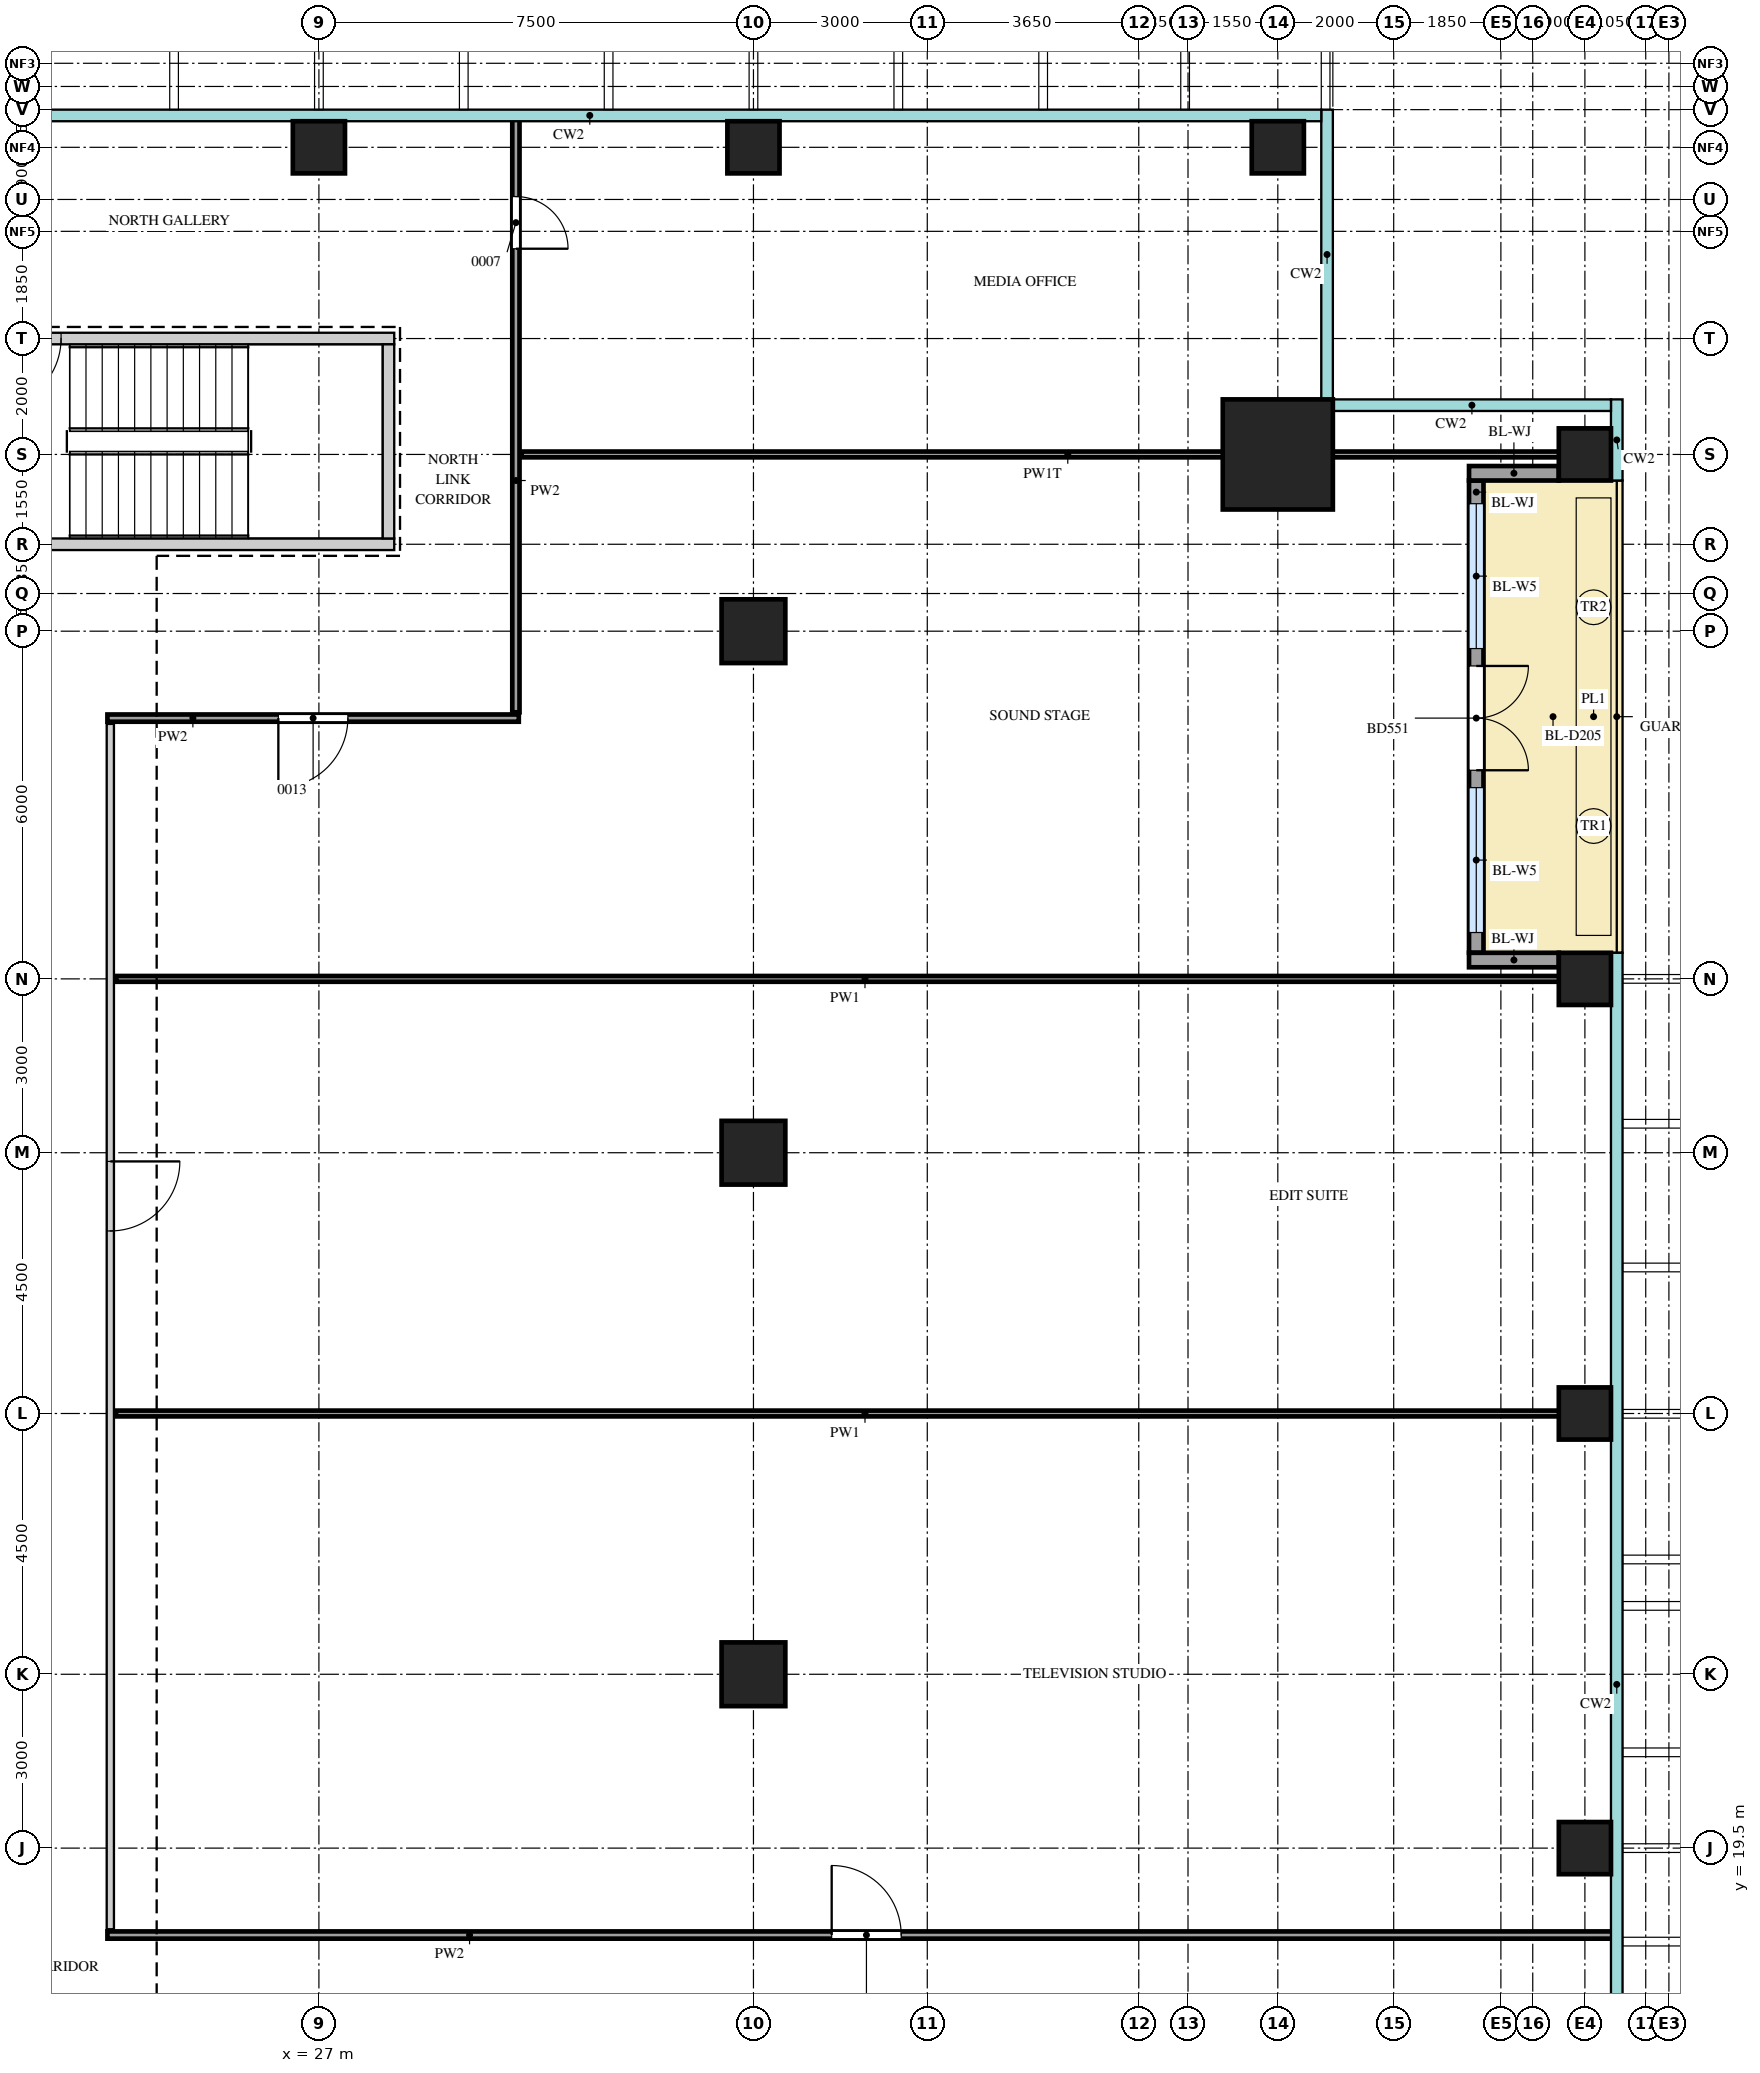
"""IFC4 building model, lengths in metres.
Left out: names, types, materials, properties, quantities, classifications, styles, units other than length and angle.
Written with IfcOpenShell. Run it as: python <this file> out.ifc"""

import sys

from ifc_helpers import new_model, si_unit, direction, frame, frame_2d, origin, origin_2d, place, context, subcontext, project, spatial, rectangle, extrude, source, transform, mapped, element, fill, save


model = new_model("IFC4")
c1 = context("Model", 3, precision=1e-05, world=origin(), true_north=direction((0.0, 1.0)))
c2 = subcontext(c1, "Body", "Model", "MODEL_VIEW")
j1 = project(units=[si_unit("LENGTHUNIT", "METRE"), si_unit("PLANEANGLEUNIT", "RADIAN")], contexts=[c1])
p1 = place(None, origin())
s1 = spatial("IfcSite", under=j1, at=p1, CompositionType="ELEMENT")
p2 = place(p1, origin())
s2 = spatial("IfcBuilding", under=s1, at=p2, CompositionType="ELEMENT")
p3 = place(p2, frame((0.0, 0.0, 246.2)))
s3 = spatial("IfcBuildingStorey", under=s2, at=p3, CompositionType="ELEMENT", Elevation=246.2)
m1 = source(origin(), c2, "Body", "SweptSolid", [
    extrude(rectangle(XDim=7.1, YDim=0.2, at=frame_2d((3.55, 0.0))), origin(), (0.0, 0.0, 1.0), 3.75),
])
p4 = place(p3, frame((21.2, 45.55, 0.0), z_axis=(0.0, 0.0, 1.0), x_axis=(1.0, 0.0, 0.0)))
e1 = element("IfcWall", 1, at=p4, inside=s3, PredefinedType="SHEAR", context=c2, shape_type="MappedRepresentation", body=[
    mapped(m1, transform((0.0, 0.0, 0.0))),
])
m2 = source(origin(), c2, "Body", "SweptSolid", [
    extrude(rectangle(XDim=1.2, YDim=2.1, at=frame_2d((0.6, 1.05))), frame((0.0, 0.11, 0.0), z_axis=(0.0, -1.0, 0.0), x_axis=(1.0, 0.0, 0.0)), (0.0, 0.0, 1.0), 0.22),
])
p5 = place(p4, frame((0.15, 0.0, 0.0)))
e2 = element("IfcOpeningElement", 2, at=p5, cuts=e1, PredefinedType="OPENING", context=c2, shape_type="MappedRepresentation", body=[
    mapped(m2, transform((0.0, 0.0, 0.0))),
])
p6 = place(p3, frame((21.2, 42.0, 0.0), z_axis=(0.0, 0.0, 1.0), x_axis=(1.0, 0.0, 0.0)))
e3 = element("IfcWall", 3, at=p6, inside=s3, PredefinedType="SHEAR", context=c2, shape_type="MappedRepresentation", body=[
    mapped(m1, transform((0.0, 0.0, 0.0))),
])
m3 = source(origin(), c2, "Body", "SweptSolid", [
    extrude(rectangle(XDim=3.35, YDim=0.2, at=frame_2d((1.675, 0.0))), origin(), (0.0, 0.0, 1.0), 3.75),
])
p7 = place(p3, frame((28.2, 42.1, 0.0), z_axis=(0.0, 0.0, 1.0), x_axis=(0.0, 1.0, 0.0)))
e4 = element("IfcWall", 4, at=p7, inside=s3, PredefinedType="SHEAR", context=c2, shape_type="MappedRepresentation", body=[
    mapped(m3, transform((0.0, 0.0, 0.0))),
])
m4 = source(origin(), c2, "Body", "SweptSolid", [
    extrude(rectangle(XDim=1.9, YDim=1.9, at=origin_2d()), origin(), (0.0, 0.0, 1.0), 4.0),
])
p8 = place(p3, frame((43.55, 43.55, 0.0), z_axis=(0.0, 0.0, 1.0), x_axis=(1.0, 0.0, 0.0)))
e5 = element("IfcColumn", 5, at=p8, inside=s3, PredefinedType="COLUMN", context=c2, shape_type="MappedRepresentation", body=[
    mapped(m4, transform((0.0, 0.0, 0.0))),
])
m5 = source(origin(), c2, "Body", "SweptSolid", [
    extrude(rectangle(XDim=0.9, YDim=0.9, at=origin_2d()), origin(), (0.0, 0.0, 1.0), 3.75),
])
for number, where, z_axis, x_axis in (
    (6, (48.85, 19.5, 0.0), (0.0, 0.0, 1.0), (1.0, 0.0, 0.0)),
    (7, (48.85, 27.0, 0.0), (0.0, 0.0, 1.0), (1.0, 0.0, 0.0)),
    (8, (48.85, 34.5, 0.0), (0.0, 0.0, 1.0), (1.0, 0.0, 0.0)),
    (9, (48.85, 43.55, 0.0), (0.0, 0.0, 1.0), (1.0, 0.0, 0.0)),
    (10, (27.0, 48.85, 0.0), (0.0, 0.0, 1.0), (1.0, 0.0, 0.0)),
    (11, (34.5, 48.85, 0.0), (0.0, 0.0, 1.0), (1.0, 0.0, 0.0)),
    (12, (43.55, 48.85, 0.0), (0.0, 0.0, 1.0), (1.0, 0.0, 0.0)),
):
    element("IfcColumn", number, at=place(p3, frame(where, z_axis=z_axis, x_axis=x_axis)), inside=s3, PredefinedType="COLUMN", context=c2, shape_type="MappedRepresentation", body=[
        mapped(m5, transform((0.0, 0.0, 0.0))),
    ])
m6 = source(origin(), c2, "Body", "SweptSolid", [
    extrude(rectangle(XDim=1.1, YDim=1.1, at=origin_2d()), origin(), (0.0, 0.0, 1.0), 3.75),
])
for number, where, z_axis, x_axis in (
    (13, (34.5, 22.5, 0.0), (0.0, 0.0, 1.0), (1.0, 0.0, 0.0)),
    (14, (34.5, 31.5, 0.0), (0.0, 0.0, 1.0), (1.0, 0.0, 0.0)),
    (15, (34.5, 40.5, 0.0), (0.0, 0.0, 1.0), (1.0, 0.0, 0.0)),
):
    element("IfcColumn", number, at=place(p3, frame(where, z_axis=z_axis, x_axis=x_axis)), inside=s3, PredefinedType="COLUMN", context=c2, shape_type="MappedRepresentation", body=[
        mapped(m6, transform((0.0, 0.0, 0.0))),
    ])
m7 = source(origin(), c2, "Body", "SweptSolid", [
    extrude(rectangle(XDim=8.15, YDim=0.25, at=frame_2d((4.075, 0.0))), origin(), (0.0, 0.0, 1.0), 3.2),
])
p9 = place(p3, frame((46.975, 34.95, 0.0), z_axis=(0.0, 0.0, 1.0), x_axis=(0.0, 1.0, 0.0)))
e16 = element("IfcWall", 16, at=p9, inside=s3, PredefinedType="SOLIDWALL", context=c2, shape_type="MappedRepresentation", body=[
    mapped(m7, transform((0.0, 0.0, 0.0))),
])
m8 = source(origin(), c2, "Body", "SweptSolid", [
    extrude(rectangle(XDim=2.5, YDim=2.4, at=frame_2d((1.25, 1.2))), frame((0.0, 0.135, 0.0), z_axis=(0.0, -1.0, 0.0), x_axis=(1.0, 0.0, 0.0)), (0.0, 0.0, 1.0), 0.27),
])
p10 = place(p9, frame((0.35, 0.0, 0.0)))
e17 = element("IfcOpeningElement", 17, at=p10, cuts=e16, PredefinedType="OPENING", context=c2, shape_type="MappedRepresentation", body=[
    mapped(m8, transform((0.0, 0.0, 0.0))),
])
p11 = place(p9, frame((5.25, 0.0, 0.0)))
e18 = element("IfcOpeningElement", 18, at=p11, cuts=e16, PredefinedType="OPENING", context=c2, shape_type="MappedRepresentation", body=[
    mapped(m8, transform((0.0, 0.0, 0.0))),
])
m9 = source(origin(), c2, "Body", "SweptSolid", [
    extrude(rectangle(XDim=1.8, YDim=2.4, at=frame_2d((0.9, 1.2))), frame((0.0, 0.135, 0.0), z_axis=(0.0, -1.0, 0.0), x_axis=(1.0, 0.0, 0.0)), (0.0, 0.0, 1.0), 0.27),
])
p12 = place(p9, frame((3.15, 0.0, 0.0)))
e19 = element("IfcOpeningElement", 19, at=p12, cuts=e16, PredefinedType="OPENING", context=c2, shape_type="MappedRepresentation", body=[
    mapped(m9, transform((0.0, 0.0, 0.0))),
])
m10 = source(origin(), c2, "Body", "SweptSolid", [
    extrude(rectangle(XDim=1.55, YDim=0.25, at=frame_2d((0.775, 0.0))), origin(), (0.0, 0.0, 1.0), 3.2),
])
for number, where, z_axis, x_axis in (
    (20, (48.4, 34.825, 0.0), (0.0, 0.0, 1.0), (-1.0, 0.0, 0.0)),
    (21, (48.4, 43.225, 0.0), (0.0, 0.0, 1.0), (-1.0, 0.0, 0.0)),
):
    element("IfcWall", number, at=place(p3, frame(where, z_axis=z_axis, x_axis=x_axis)), inside=s3, PredefinedType="SOLIDWALL", context=c2, shape_type="MappedRepresentation", body=[
        mapped(m10, transform((0.0, 0.0, 0.0))),
    ])
m11 = source(origin(), c2, "Body", "SweptSolid", [
    extrude(rectangle(XDim=26.0, YDim=0.125, at=frame_2d((13.0, 0.0))), origin(), (0.0, 0.0, 1.0), 3.8),
])
p13 = place(p3, frame((23.35, 18.0, 0.0), z_axis=(0.0, 0.0, 1.0), x_axis=(1.0, 0.0, 0.0)))
e22 = element("IfcWall", 22, at=p13, inside=s3, PredefinedType="PARTITIONING", context=c2, shape_type="MappedRepresentation", body=[
    mapped(m11, transform((0.0, 0.0, 0.0))),
])
m12 = source(origin(), c2, "Body", "SweptSolid", [
    extrude(rectangle(XDim=1.2, YDim=2.1, at=frame_2d((0.6, 1.05))), frame((0.0, 0.073, 0.0), z_axis=(0.0, -1.0, 0.0), x_axis=(1.0, 0.0, 0.0)), (0.0, 0.0, 1.0), 0.145),
])
p14 = place(p13, frame((12.5, 0.0, 0.0)))
e23 = element("IfcOpeningElement", 23, at=p14, cuts=e22, PredefinedType="OPENING", context=c2, shape_type="MappedRepresentation", body=[
    mapped(m12, transform((0.0, 0.0, 0.0))),
])
m13 = source(origin(), c2, "Body", "SweptSolid", [
    extrude(rectangle(XDim=20.8, YDim=0.125, at=frame_2d((10.4, 0.0))), origin(), (0.0, 0.0, 1.0), 3.8),
])
p15 = place(p3, frame((23.4, 18.1, 0.0), z_axis=(0.0, 0.0, 1.0), x_axis=(0.0, 1.0, 0.0)))
e24 = element("IfcWall", 24, at=p15, inside=s3, PredefinedType="PARTITIONING", context=c2, shape_type="MappedRepresentation", body=[
    mapped(m13, transform((0.0, 0.0, 0.0))),
])
p16 = place(p15, frame((12.05, 0.0, 0.0)))
e25 = element("IfcOpeningElement", 25, at=p16, cuts=e24, PredefinedType="OPENING", context=c2, shape_type="MappedRepresentation", body=[
    mapped(m12, transform((0.0, 0.0, 0.0))),
])
m14 = source(origin(), c2, "Body", "SweptSolid", [
    extrude(rectangle(XDim=25.85, YDim=0.1, at=frame_2d((12.925, 0.0))), origin(), (0.0, 0.0, 1.0), 3.8),
])
for number, where, z_axis, x_axis in (
    (26, (23.5, 27.0, 0.0), (0.0, 0.0, 1.0), (1.0, 0.0, 0.0)),
    (27, (23.5, 34.5, 0.0), (0.0, 0.0, 1.0), (1.0, 0.0, 0.0)),
):
    element("IfcWall", number, at=place(p3, frame(where, z_axis=z_axis, x_axis=x_axis)), inside=s3, PredefinedType="PARTITIONING", context=c2, shape_type="MappedRepresentation", body=[
        mapped(m14, transform((0.0, 0.0, 0.0))),
    ])
m15 = source(origin(), c2, "Body", "SweptSolid", [
    extrude(rectangle(XDim=7.1, YDim=0.125, at=frame_2d((3.55, 0.0))), origin(), (0.0, 0.0, 1.0), 3.8),
])
p17 = place(p3, frame((23.35, 39.0, 0.0), z_axis=(0.0, 0.0, 1.0), x_axis=(1.0, 0.0, 0.0)))
e28 = element("IfcWall", 28, at=p17, inside=s3, PredefinedType="PARTITIONING", context=c2, shape_type="MappedRepresentation", body=[
    mapped(m15, transform((0.0, 0.0, 0.0))),
])
p18 = place(p17, frame((2.95, 0.0, 0.0)))
e29 = element("IfcOpeningElement", 29, at=p18, cuts=e28, PredefinedType="OPENING", context=c2, shape_type="MappedRepresentation", body=[
    mapped(m12, transform((0.0, 0.0, 0.0))),
])
m16 = source(origin(), c2, "Body", "SweptSolid", [
    extrude(rectangle(XDim=10.25, YDim=0.125, at=frame_2d((5.125, 0.0))), origin(), (0.0, 0.0, 1.0), 3.8),
])
p19 = place(p3, frame((30.4, 39.1, 0.0), z_axis=(0.0, 0.0, 1.0), x_axis=(0.0, 1.0, 0.0)))
e30 = element("IfcWall", 30, at=p19, inside=s3, PredefinedType="PARTITIONING", context=c2, shape_type="MappedRepresentation", body=[
    mapped(m16, transform((0.0, 0.0, 0.0))),
])
m17 = source(origin(), c2, "Body", "SweptSolid", [
    extrude(rectangle(XDim=0.9, YDim=2.1, at=frame_2d((0.45, 1.05))), frame((0.0, 0.073, 0.0), z_axis=(0.0, -1.0, 0.0), x_axis=(1.0, 0.0, 0.0)), (0.0, 0.0, 1.0), 0.145),
])
p20 = place(p19, frame((8.0, 0.0, 0.0)))
e31 = element("IfcOpeningElement", 31, at=p20, cuts=e30, PredefinedType="OPENING", context=c2, shape_type="MappedRepresentation", body=[
    mapped(m17, transform((0.0, 0.0, 0.0))),
])
m18 = source(origin(), c2, "Body", "SweptSolid", [
    extrude(rectangle(XDim=18.85, YDim=0.1, at=frame_2d((9.425, 0.0))), origin(), (0.0, 0.0, 1.0), 3.3),
])
p21 = place(p3, frame((30.5, 43.55, 0.0), z_axis=(0.0, 0.0, 1.0), x_axis=(1.0, 0.0, 0.0)))
e32 = element("IfcWall", 32, at=p21, inside=s3, PredefinedType="PARTITIONING", context=c2, shape_type="MappedRepresentation", body=[
    mapped(m18, transform((0.0, 0.0, 0.0))),
])
m19 = source(origin(), c2, "Body", "SweptSolid", [
    extrude(rectangle(XDim=2.5, YDim=2.4, at=frame_2d((1.25, 1.2))), frame((0.0, 0.03, 0.0), z_axis=(0.0, -1.0, 0.0), x_axis=(1.0, 0.0, 0.0)), (0.0, 0.0, 1.0), 0.06),
])
p22 = place(p10, origin())
e33 = element("IfcWindow", 33, at=p22, inside=s3, PartitioningType="SINGLE_PANEL", PredefinedType="WINDOW", context=c2, shape_type="MappedRepresentation", body=[
    mapped(m19, transform((0.0, 0.0, 0.0))),
])
fill(e17, e33)
p23 = place(p11, origin())
e34 = element("IfcWindow", 34, at=p23, inside=s3, PartitioningType="SINGLE_PANEL", PredefinedType="WINDOW", context=c2, shape_type="MappedRepresentation", body=[
    mapped(m19, transform((0.0, 0.0, 0.0))),
])
fill(e18, e34)
m20 = source(origin(), c2, "Body", "SweptSolid", [
    extrude(rectangle(XDim=1.8, YDim=2.4, at=frame_2d((0.9, 1.2))), frame((0.0, 0.025, 0.0), z_axis=(0.0, -1.0, 0.0), x_axis=(1.0, 0.0, 0.0)), (0.0, 0.0, 1.0), 0.05),
])
p24 = place(p12, origin())
e35 = element("IfcDoor", 35, at=p24, inside=s3, OperationType="DOUBLE_DOOR_DOUBLE_SWING", PredefinedType="DOOR", context=c2, shape_type="MappedRepresentation", body=[
    mapped(m20, transform((0.0, 0.0, 0.0))),
])
fill(e19, e35)
m21 = source(origin(), c2, "Body", "SweptSolid", [
    extrude(rectangle(XDim=1.2, YDim=2.1, at=frame_2d((0.6, 1.05))), frame((0.0, 0.025, 0.0), z_axis=(0.0, -1.0, 0.0), x_axis=(1.0, 0.0, 0.0)), (0.0, 0.0, 1.0), 0.05),
])
p25 = place(p14, origin())
e36 = element("IfcDoor", 36, at=p25, inside=s3, OperationType="SINGLE_SWING_RIGHT", PredefinedType="DOOR", context=c2, shape_type="MappedRepresentation", body=[
    mapped(m21, transform((0.0, 0.0, 0.0))),
])
fill(e23, e36)
p26 = place(p16, origin())
e37 = element("IfcDoor", 37, at=p26, inside=s3, OperationType="SINGLE_SWING_RIGHT", PredefinedType="DOOR", context=c2, shape_type="MappedRepresentation", body=[
    mapped(m21, transform((0.0, 0.0, 0.0))),
])
fill(e25, e37)
p27 = place(p18, origin())
e38 = element("IfcDoor", 38, at=p27, inside=s3, OperationType="SINGLE_SWING_LEFT", PredefinedType="DOOR", context=c2, shape_type="MappedRepresentation", body=[
    mapped(m21, transform((0.0, 0.0, 0.0))),
])
fill(e29, e38)
m22 = source(origin(), c2, "Body", "SweptSolid", [
    extrude(rectangle(XDim=0.9, YDim=2.1, at=frame_2d((0.45, 1.05))), frame((0.0, 0.025, 0.0), z_axis=(0.0, -1.0, 0.0), x_axis=(1.0, 0.0, 0.0)), (0.0, 0.0, 1.0), 0.05),
])
p28 = place(p20, origin())
e39 = element("IfcDoor", 39, at=p28, inside=s3, OperationType="SINGLE_SWING_LEFT", PredefinedType="DOOR", context=c2, shape_type="MappedRepresentation", body=[
    mapped(m22, transform((0.0, 0.0, 0.0))),
])
fill(e31, e39)
p29 = place(p5, origin())
e40 = element("IfcDoor", 40, at=p29, inside=s3, OperationType="SINGLE_SWING_LEFT", PredefinedType="DOOR", context=c2, shape_type="MappedRepresentation", body=[
    mapped(m21, transform((0.0, 0.0, 0.0))),
])
fill(e2, e40)
save(model, sys.argv[1])
